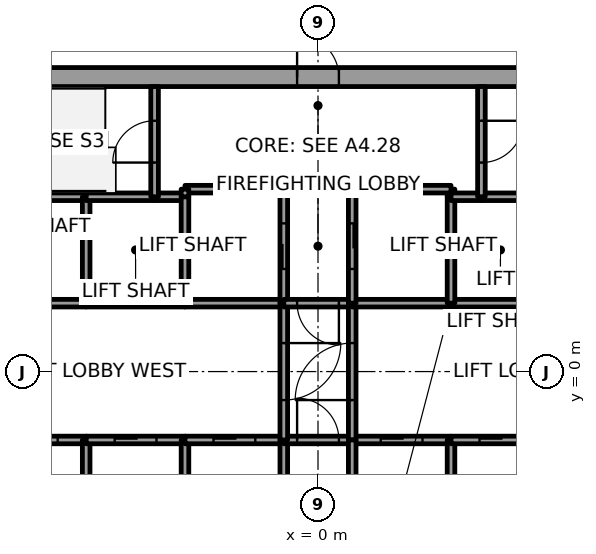
"""IFC4 building model, lengths in metres.
Left out: names, types, materials, properties, quantities, classifications, styles, units other than length and angle.
Written with IfcOpenShell. Run it as: python <this file> out.ifc"""

import sys

from ifc_helpers import new_model, si_unit, direction, frame, frame_2d, origin, place, context, subcontext, project, spatial, rectangle, extrude, element, fill, save


model = new_model("IFC4")
c1 = context("Model", 3, precision=1e-05, world=origin(), true_north=direction((0.0, 1.0)))
c2 = subcontext(c1, "Body", "Model", "MODEL_VIEW")
j1 = project(units=[si_unit("LENGTHUNIT", "METRE"), si_unit("PLANEANGLEUNIT", "RADIAN")], contexts=[c1])
p1 = place(None, origin())
s1 = spatial("IfcSite", under=j1, at=p1, CompositionType="ELEMENT")
p2 = place(p1, origin())
s2 = spatial("IfcBuilding", under=s1, at=p2, CompositionType="ELEMENT")
p3 = place(p2, frame((0.0, 0.0, 125.8)))
s3 = spatial("IfcBuildingStorey", under=s2, at=p3, CompositionType="ELEMENT", Elevation=125.8)
p4 = place(p3, frame((-11.0, 7.75, 0.0), z_axis=(0.0, 0.0, 1.0), x_axis=(1.0, 0.0, 0.0)))
e1 = element("IfcWall", 1, at=p4, inside=s3, PredefinedType="SHEAR", context=c2, shape_type="SweptSolid", body=[
    extrude(rectangle(XDim=22.0, YDim=0.5, at=frame_2d((11.0, 0.0))), origin(), (0.0, 0.0, 1.0), 4.0),
])
p5 = place(p4, frame((10.45, 0.0, 0.0)))
e2 = element("IfcOpeningElement", 2, at=p5, cuts=e1, PredefinedType="OPENING", context=c2, shape_type="SweptSolid", body=[
    extrude(rectangle(XDim=1.1, YDim=2.1, at=frame_2d((0.55, 1.05))), frame((0.0, 0.25, 0.0), z_axis=(0.0, -1.0, 0.0), x_axis=(1.0, 0.0, 0.0)), (0.0, 0.0, 1.0), 0.5),
])
p6 = place(p3, frame((-8.7, -1.8, 0.0), z_axis=(0.0, 0.0, 1.0), x_axis=(1.0, 0.0, 0.0)))
e3 = element("IfcWall", 3, at=p6, inside=s3, PredefinedType="SOLIDWALL", context=c2, shape_type="SweptSolid", body=[
    extrude(rectangle(XDim=2.6, YDim=0.2, at=frame_2d((1.3, 0.0))), origin(), (0.0, 0.0, 1.0), 3.85),
])
p7 = place(p6, frame((0.75, 0.0, 0.0)))
e4 = element("IfcOpeningElement", 4, at=p7, cuts=e3, PredefinedType="OPENING", context=c2, shape_type="SweptSolid", body=[
    extrude(rectangle(XDim=1.1, YDim=2.1, at=frame_2d((0.55, 1.05))), frame((0.0, 0.1, 0.0), z_axis=(0.0, -1.0, 0.0), x_axis=(1.0, 0.0, 0.0)), (0.0, 0.0, 1.0), 0.2),
])
for number, where, z_axis, x_axis in (
    (5, (-6.1, 1.8, 0.0), (0.0, 0.0, 1.0), (-1.0, 0.0, 0.0)),
    (6, (-6.1, 4.6, 0.0), (0.0, 0.0, 1.0), (-1.0, 0.0, 0.0)),
):
    element("IfcWall", number, at=place(p3, frame(where, z_axis=z_axis, x_axis=x_axis)), inside=s3, PredefinedType="SOLIDWALL", context=c2, shape_type="SweptSolid", body=[
        extrude(rectangle(XDim=2.6, YDim=0.2, at=frame_2d((1.3, 0.0))), origin(), (0.0, 0.0, 1.0), 3.85),
    ])
p8 = place(p3, frame((-6.1, -4.6, 0.0), z_axis=(0.0, 0.0, 1.0), x_axis=(0.0, 1.0, 0.0)))
e7 = element("IfcWall", 7, at=p8, inside=s3, PredefinedType="SOLIDWALL", context=c2, shape_type="SweptSolid", body=[
    extrude(rectangle(XDim=2.8, YDim=0.2, at=frame_2d((1.4, 0.0))), origin(), (0.0, 0.0, 1.0), 3.85),
])
p9 = place(p3, frame((-6.1, -1.8, 0.0), z_axis=(0.0, 0.0, 1.0), x_axis=(1.0, 0.0, 0.0)))
e8 = element("IfcWall", 8, at=p9, inside=s3, PredefinedType="SOLIDWALL", context=c2, shape_type="SweptSolid", body=[
    extrude(rectangle(XDim=2.6, YDim=0.2, at=frame_2d((1.3, 0.0))), origin(), (0.0, 0.0, 1.0), 3.85),
])
p10 = place(p9, frame((0.75, 0.0, 0.0)))
e9 = element("IfcOpeningElement", 9, at=p10, cuts=e8, PredefinedType="OPENING", context=c2, shape_type="SweptSolid", body=[
    extrude(rectangle(XDim=1.1, YDim=2.1, at=frame_2d((0.55, 1.05))), frame((0.0, 0.1, 0.0), z_axis=(0.0, -1.0, 0.0), x_axis=(1.0, 0.0, 0.0)), (0.0, 0.0, 1.0), 0.2),
])
p11 = place(p3, frame((-3.5, 1.8, 0.0), z_axis=(0.0, 0.0, 1.0), x_axis=(-1.0, 0.0, 0.0)))
e10 = element("IfcWall", 10, at=p11, inside=s3, PredefinedType="SOLIDWALL", context=c2, shape_type="SweptSolid", body=[
    extrude(rectangle(XDim=2.6, YDim=0.2, at=frame_2d((1.3, 0.0))), origin(), (0.0, 0.0, 1.0), 3.85),
])
p12 = place(p3, frame((-6.1, 1.8, 0.0), z_axis=(0.0, 0.0, 1.0), x_axis=(0.0, 1.0, 0.0)))
e11 = element("IfcWall", 11, at=p12, inside=s3, PredefinedType="SOLIDWALL", context=c2, shape_type="SweptSolid", body=[
    extrude(rectangle(XDim=2.8, YDim=0.2, at=frame_2d((1.4, 0.0))), origin(), (0.0, 0.0, 1.0), 3.85),
])
p13 = place(p3, frame((-4.3, 4.6, 0.0), z_axis=(0.0, 0.0, 1.0), x_axis=(-1.0, 0.0, 0.0)))
e12 = element("IfcWall", 12, at=p13, inside=s3, PredefinedType="SOLIDWALL", context=c2, shape_type="SweptSolid", body=[
    extrude(rectangle(XDim=1.8, YDim=0.2, at=frame_2d((0.9, 0.0))), origin(), (0.0, 0.0, 1.0), 3.85),
])
p14 = place(p3, frame((-3.5, 4.6, 0.0), z_axis=(0.0, 0.0, 1.0), x_axis=(-1.0, 0.0, 0.0)))
e13 = element("IfcWall", 13, at=p14, inside=s3, PredefinedType="SOLIDWALL", context=c2, shape_type="SweptSolid", body=[
    extrude(rectangle(XDim=0.8, YDim=0.2, at=frame_2d((0.4, 0.0))), origin(), (0.0, 0.0, 1.0), 3.85),
])
p15 = place(p3, frame((-4.3, 4.6, 0.0), z_axis=(0.0, 0.0, 1.0), x_axis=(0.0, 1.0, 0.0)))
e14 = element("IfcWall", 14, at=p15, inside=s3, PredefinedType="SOLIDWALL", context=c2, shape_type="SweptSolid", body=[
    extrude(rectangle(XDim=2.9, YDim=0.2, at=frame_2d((1.45, 0.0))), origin(), (0.0, 0.0, 1.0), 3.85),
])
p16 = place(p15, frame((0.9, 0.0, 0.0)))
e15 = element("IfcOpeningElement", 15, at=p16, cuts=e14, PredefinedType="OPENING", context=c2, shape_type="SweptSolid", body=[
    extrude(rectangle(XDim=1.1, YDim=2.1, at=frame_2d((0.55, 1.05))), frame((0.0, 0.1, 0.0), z_axis=(0.0, -1.0, 0.0), x_axis=(1.0, 0.0, 0.0)), (0.0, 0.0, 1.0), 0.2),
])
p17 = place(p3, frame((-3.5, -4.6, 0.0), z_axis=(0.0, 0.0, 1.0), x_axis=(0.0, 1.0, 0.0)))
e16 = element("IfcWall", 16, at=p17, inside=s3, PredefinedType="SOLIDWALL", context=c2, shape_type="SweptSolid", body=[
    extrude(rectangle(XDim=2.8, YDim=0.2, at=frame_2d((1.4, 0.0))), origin(), (0.0, 0.0, 1.0), 3.85),
])
p18 = place(p3, frame((-3.5, -1.8, 0.0), z_axis=(0.0, 0.0, 1.0), x_axis=(1.0, 0.0, 0.0)))
e17 = element("IfcWall", 17, at=p18, inside=s3, PredefinedType="SOLIDWALL", context=c2, shape_type="SweptSolid", body=[
    extrude(rectangle(XDim=2.6, YDim=0.2, at=frame_2d((1.3, 0.0))), origin(), (0.0, 0.0, 1.0), 3.85),
])
p19 = place(p18, frame((0.75, 0.0, 0.0)))
e18 = element("IfcOpeningElement", 18, at=p19, cuts=e17, PredefinedType="OPENING", context=c2, shape_type="SweptSolid", body=[
    extrude(rectangle(XDim=1.1, YDim=2.1, at=frame_2d((0.55, 1.05))), frame((0.0, 0.1, 0.0), z_axis=(0.0, -1.0, 0.0), x_axis=(1.0, 0.0, 0.0)), (0.0, 0.0, 1.0), 0.2),
])
p20 = place(p3, frame((-0.9, 1.8, 0.0), z_axis=(0.0, 0.0, 1.0), x_axis=(-1.0, 0.0, 0.0)))
e19 = element("IfcWall", 19, at=p20, inside=s3, PredefinedType="SOLIDWALL", context=c2, shape_type="SweptSolid", body=[
    extrude(rectangle(XDim=2.6, YDim=0.2, at=frame_2d((1.3, 0.0))), origin(), (0.0, 0.0, 1.0), 3.85),
])
p21 = place(p3, frame((-3.5, 4.6, 0.0), z_axis=(0.0, 0.0, 1.0), x_axis=(0.0, -1.0, 0.0)))
e20 = element("IfcWall", 20, at=p21, inside=s3, PredefinedType="SOLIDWALL", context=c2, shape_type="SweptSolid", body=[
    extrude(rectangle(XDim=2.8, YDim=0.2, at=frame_2d((1.4, 0.0))), origin(), (0.0, 0.0, 1.0), 3.85),
])
p22 = place(p3, frame((-0.9, 1.8, 0.0), z_axis=(0.0, 0.0, 1.0), x_axis=(0.0, 1.0, 0.0)))
e21 = element("IfcWall", 21, at=p22, inside=s3, PredefinedType="SOLIDWALL", context=c2, shape_type="SweptSolid", body=[
    extrude(rectangle(XDim=3.0, YDim=0.2, at=frame_2d((1.5, 0.0))), origin(), (0.0, 0.0, 1.0), 3.85),
])
p23 = place(p22, frame((0.9, 0.0, 0.0)))
e22 = element("IfcOpeningElement", 22, at=p23, cuts=e21, PredefinedType="OPENING", context=c2, shape_type="SweptSolid", body=[
    extrude(rectangle(XDim=1.2, YDim=2.1, at=frame_2d((0.6, 1.05))), frame((0.0, 0.1, 0.0), z_axis=(0.0, -1.0, 0.0), x_axis=(1.0, 0.0, 0.0)), (0.0, 0.0, 1.0), 0.2),
])
p24 = place(p3, frame((-0.9, 4.8, 0.0), z_axis=(0.0, 0.0, 1.0), x_axis=(-1.0, 0.0, 0.0)))
e23 = element("IfcWall", 23, at=p24, inside=s3, PredefinedType="SOLIDWALL", context=c2, shape_type="SweptSolid", body=[
    extrude(rectangle(XDim=2.6, YDim=0.2, at=frame_2d((1.3, 0.0))), origin(), (0.0, 0.0, 1.0), 3.85),
])
p25 = place(p3, frame((-3.5, 4.8, 0.0), z_axis=(0.0, 0.0, 1.0), x_axis=(0.0, -1.0, 0.0)))
e24 = element("IfcWall", 24, at=p25, inside=s3, PredefinedType="SOLIDWALL", context=c2, shape_type="SweptSolid", body=[
    extrude(rectangle(XDim=0.2, YDim=0.2, at=frame_2d((0.1, 0.0))), origin(), (0.0, 0.0, 1.0), 3.85),
])
p26 = place(p3, frame((-0.9, -4.6, 0.0), z_axis=(0.0, 0.0, 1.0), x_axis=(0.0, 1.0, 0.0)))
e25 = element("IfcWall", 25, at=p26, inside=s3, PredefinedType="SOLIDWALL", context=c2, shape_type="SweptSolid", body=[
    extrude(rectangle(XDim=2.8, YDim=0.2, at=frame_2d((1.4, 0.0))), origin(), (0.0, 0.0, 1.0), 3.85),
])
p27 = place(p3, frame((-0.9, -1.8, 0.0), z_axis=(0.0, 0.0, 1.0), x_axis=(1.0, 0.0, 0.0)))
e26 = element("IfcWall", 26, at=p27, inside=s3, PredefinedType="SOLIDWALL", context=c2, shape_type="SweptSolid", body=[
    extrude(rectangle(XDim=1.8, YDim=0.2, at=frame_2d((0.9, 0.0))), origin(), (0.0, 0.0, 1.0), 3.85),
])
p28 = place(p27, frame((0.35, 0.0, 0.0)))
e27 = element("IfcOpeningElement", 27, at=p28, cuts=e26, PredefinedType="OPENING", context=c2, shape_type="SweptSolid", body=[
    extrude(rectangle(XDim=1.1, YDim=2.1, at=frame_2d((0.55, 1.05))), frame((0.0, 0.1, 0.0), z_axis=(0.0, -1.0, 0.0), x_axis=(1.0, 0.0, 0.0)), (0.0, 0.0, 1.0), 0.2),
])
p29 = place(p3, frame((-0.9, 1.8, 0.0), z_axis=(0.0, 0.0, 1.0), x_axis=(0.0, -1.0, 0.0)))
e28 = element("IfcWall", 28, at=p29, inside=s3, PredefinedType="SOLIDWALL", context=c2, shape_type="SweptSolid", body=[
    extrude(rectangle(XDim=3.6, YDim=0.2, at=frame_2d((1.8, 0.0))), origin(), (0.0, 0.0, 1.0), 3.85),
])
p30 = place(p29, frame((1.05, 0.0, 0.0)))
e29 = element("IfcOpeningElement", 29, at=p30, cuts=e28, PredefinedType="OPENING", context=c2, shape_type="SweptSolid", body=[
    extrude(rectangle(XDim=1.5, YDim=2.1, at=frame_2d((0.75, 1.05))), frame((0.0, 0.1, 0.0), z_axis=(0.0, -1.0, 0.0), x_axis=(1.0, 0.0, 0.0)), (0.0, 0.0, 1.0), 0.2),
])
p31 = place(p3, frame((0.9, 1.8, 0.0), z_axis=(0.0, 0.0, 1.0), x_axis=(-1.0, 0.0, 0.0)))
e30 = element("IfcWall", 30, at=p31, inside=s3, PredefinedType="SOLIDWALL", context=c2, shape_type="SweptSolid", body=[
    extrude(rectangle(XDim=1.8, YDim=0.2, at=frame_2d((0.9, 0.0))), origin(), (0.0, 0.0, 1.0), 3.85),
])
p32 = place(p31, frame((0.35, 0.0, 0.0)))
e31 = element("IfcOpeningElement", 31, at=p32, cuts=e30, PredefinedType="OPENING", context=c2, shape_type="SweptSolid", body=[
    extrude(rectangle(XDim=1.1, YDim=2.1, at=frame_2d((0.55, 1.05))), frame((0.0, 0.1, 0.0), z_axis=(0.0, -1.0, 0.0), x_axis=(1.0, 0.0, 0.0)), (0.0, 0.0, 1.0), 0.2),
])
p33 = place(p3, frame((0.9, -1.8, 0.0), z_axis=(0.0, 0.0, 1.0), x_axis=(1.0, 0.0, 0.0)))
e32 = element("IfcWall", 32, at=p33, inside=s3, PredefinedType="SOLIDWALL", context=c2, shape_type="SweptSolid", body=[
    extrude(rectangle(XDim=2.6, YDim=0.2, at=frame_2d((1.3, 0.0))), origin(), (0.0, 0.0, 1.0), 3.85),
])
p34 = place(p33, frame((0.75, 0.0, 0.0)))
e33 = element("IfcOpeningElement", 33, at=p34, cuts=e32, PredefinedType="OPENING", context=c2, shape_type="SweptSolid", body=[
    extrude(rectangle(XDim=1.1, YDim=2.1, at=frame_2d((0.55, 1.05))), frame((0.0, 0.1, 0.0), z_axis=(0.0, -1.0, 0.0), x_axis=(1.0, 0.0, 0.0)), (0.0, 0.0, 1.0), 0.2),
])
p35 = place(p3, frame((0.9, -1.8, 0.0), z_axis=(0.0, 0.0, 1.0), x_axis=(0.0, 1.0, 0.0)))
e34 = element("IfcWall", 34, at=p35, inside=s3, PredefinedType="SOLIDWALL", context=c2, shape_type="SweptSolid", body=[
    extrude(rectangle(XDim=3.6, YDim=0.2, at=frame_2d((1.8, 0.0))), origin(), (0.0, 0.0, 1.0), 3.85),
])
p36 = place(p35, frame((1.05, 0.0, 0.0)))
e35 = element("IfcOpeningElement", 35, at=p36, cuts=e34, PredefinedType="OPENING", context=c2, shape_type="SweptSolid", body=[
    extrude(rectangle(XDim=1.5, YDim=2.1, at=frame_2d((0.75, 1.05))), frame((0.0, 0.1, 0.0), z_axis=(0.0, -1.0, 0.0), x_axis=(1.0, 0.0, 0.0)), (0.0, 0.0, 1.0), 0.2),
])
p37 = place(p3, frame((0.9, -1.8, 0.0), z_axis=(0.0, 0.0, 1.0), x_axis=(0.0, -1.0, 0.0)))
e36 = element("IfcWall", 36, at=p37, inside=s3, PredefinedType="SOLIDWALL", context=c2, shape_type="SweptSolid", body=[
    extrude(rectangle(XDim=2.8, YDim=0.2, at=frame_2d((1.4, 0.0))), origin(), (0.0, 0.0, 1.0), 3.85),
])
p38 = place(p3, frame((3.5, 1.8, 0.0), z_axis=(0.0, 0.0, 1.0), x_axis=(-1.0, 0.0, 0.0)))
e37 = element("IfcWall", 37, at=p38, inside=s3, PredefinedType="SOLIDWALL", context=c2, shape_type="SweptSolid", body=[
    extrude(rectangle(XDim=2.6, YDim=0.2, at=frame_2d((1.3, 0.0))), origin(), (0.0, 0.0, 1.0), 3.85),
])
p39 = place(p3, frame((3.5, 4.6, 0.0), z_axis=(0.0, 0.0, 1.0), x_axis=(0.0, 1.0, 0.0)))
e38 = element("IfcWall", 38, at=p39, inside=s3, PredefinedType="SOLIDWALL", context=c2, shape_type="SweptSolid", body=[
    extrude(rectangle(XDim=0.2, YDim=0.2, at=frame_2d((0.1, 0.0))), origin(), (0.0, 0.0, 1.0), 3.85),
])
p40 = place(p3, frame((3.5, 4.8, 0.0), z_axis=(0.0, 0.0, 1.0), x_axis=(-1.0, 0.0, 0.0)))
e39 = element("IfcWall", 39, at=p40, inside=s3, PredefinedType="SOLIDWALL", context=c2, shape_type="SweptSolid", body=[
    extrude(rectangle(XDim=2.6, YDim=0.2, at=frame_2d((1.3, 0.0))), origin(), (0.0, 0.0, 1.0), 3.85),
])
p41 = place(p3, frame((0.9, 4.8, 0.0), z_axis=(0.0, 0.0, 1.0), x_axis=(0.0, -1.0, 0.0)))
e40 = element("IfcWall", 40, at=p41, inside=s3, PredefinedType="SOLIDWALL", context=c2, shape_type="SweptSolid", body=[
    extrude(rectangle(XDim=3.0, YDim=0.2, at=frame_2d((1.5, 0.0))), origin(), (0.0, 0.0, 1.0), 3.85),
])
p42 = place(p41, frame((0.9, 0.0, 0.0)))
e41 = element("IfcOpeningElement", 41, at=p42, cuts=e40, PredefinedType="OPENING", context=c2, shape_type="SweptSolid", body=[
    extrude(rectangle(XDim=1.2, YDim=2.1, at=frame_2d((0.6, 1.05))), frame((0.0, 0.1, 0.0), z_axis=(0.0, -1.0, 0.0), x_axis=(1.0, 0.0, 0.0)), (0.0, 0.0, 1.0), 0.2),
])
p43 = place(p3, frame((3.5, -4.6, 0.0), z_axis=(0.0, 0.0, 1.0), x_axis=(0.0, 1.0, 0.0)))
e42 = element("IfcWall", 42, at=p43, inside=s3, PredefinedType="SOLIDWALL", context=c2, shape_type="SweptSolid", body=[
    extrude(rectangle(XDim=2.8, YDim=0.2, at=frame_2d((1.4, 0.0))), origin(), (0.0, 0.0, 1.0), 3.85),
])
p44 = place(p3, frame((3.5, -1.8, 0.0), z_axis=(0.0, 0.0, 1.0), x_axis=(1.0, 0.0, 0.0)))
e43 = element("IfcWall", 43, at=p44, inside=s3, PredefinedType="SOLIDWALL", context=c2, shape_type="SweptSolid", body=[
    extrude(rectangle(XDim=2.6, YDim=0.2, at=frame_2d((1.3, 0.0))), origin(), (0.0, 0.0, 1.0), 3.85),
])
p45 = place(p44, frame((0.75, 0.0, 0.0)))
e44 = element("IfcOpeningElement", 44, at=p45, cuts=e43, PredefinedType="OPENING", context=c2, shape_type="SweptSolid", body=[
    extrude(rectangle(XDim=1.1, YDim=2.1, at=frame_2d((0.55, 1.05))), frame((0.0, 0.1, 0.0), z_axis=(0.0, -1.0, 0.0), x_axis=(1.0, 0.0, 0.0)), (0.0, 0.0, 1.0), 0.2),
])
p46 = place(p3, frame((6.1, 1.8, 0.0), z_axis=(0.0, 0.0, 1.0), x_axis=(-1.0, 0.0, 0.0)))
e45 = element("IfcWall", 45, at=p46, inside=s3, PredefinedType="SOLIDWALL", context=c2, shape_type="SweptSolid", body=[
    extrude(rectangle(XDim=2.6, YDim=0.2, at=frame_2d((1.3, 0.0))), origin(), (0.0, 0.0, 1.0), 3.85),
])
p47 = place(p3, frame((3.5, 1.8, 0.0), z_axis=(0.0, 0.0, 1.0), x_axis=(0.0, 1.0, 0.0)))
e46 = element("IfcWall", 46, at=p47, inside=s3, PredefinedType="SOLIDWALL", context=c2, shape_type="SweptSolid", body=[
    extrude(rectangle(XDim=2.8, YDim=0.2, at=frame_2d((1.4, 0.0))), origin(), (0.0, 0.0, 1.0), 3.85),
])
p48 = place(p3, frame((4.3, 4.6, 0.0), z_axis=(0.0, 0.0, 1.0), x_axis=(-1.0, 0.0, 0.0)))
e47 = element("IfcWall", 47, at=p48, inside=s3, PredefinedType="SOLIDWALL", context=c2, shape_type="SweptSolid", body=[
    extrude(rectangle(XDim=0.8, YDim=0.2, at=frame_2d((0.4, 0.0))), origin(), (0.0, 0.0, 1.0), 3.85),
])
p49 = place(p3, frame((6.1, 4.6, 0.0), z_axis=(0.0, 0.0, 1.0), x_axis=(-1.0, 0.0, 0.0)))
e48 = element("IfcWall", 48, at=p49, inside=s3, PredefinedType="SOLIDWALL", context=c2, shape_type="SweptSolid", body=[
    extrude(rectangle(XDim=1.8, YDim=0.2, at=frame_2d((0.9, 0.0))), origin(), (0.0, 0.0, 1.0), 3.85),
])
p50 = place(p3, frame((4.3, 7.5, 0.0), z_axis=(0.0, 0.0, 1.0), x_axis=(0.0, -1.0, 0.0)))
e49 = element("IfcWall", 49, at=p50, inside=s3, PredefinedType="SOLIDWALL", context=c2, shape_type="SweptSolid", body=[
    extrude(rectangle(XDim=2.9, YDim=0.2, at=frame_2d((1.45, 0.0))), origin(), (0.0, 0.0, 1.0), 3.85),
])
p51 = place(p50, frame((0.9, 0.0, 0.0)))
e50 = element("IfcOpeningElement", 50, at=p51, cuts=e49, PredefinedType="OPENING", context=c2, shape_type="SweptSolid", body=[
    extrude(rectangle(XDim=1.1, YDim=2.1, at=frame_2d((0.55, 1.05))), frame((0.0, 0.1, 0.0), z_axis=(0.0, -1.0, 0.0), x_axis=(1.0, 0.0, 0.0)), (0.0, 0.0, 1.0), 0.2),
])
p52 = place(p7, origin())
e51 = element("IfcDoor", 51, at=p52, inside=s3, OperationType="SLIDING_TO_RIGHT", PredefinedType="DOOR", context=c2, shape_type="SweptSolid", body=[
    extrude(rectangle(XDim=1.1, YDim=2.1, at=frame_2d((0.55, 1.05))), frame((0.0, 0.025, 0.0), z_axis=(0.0, -1.0, 0.0), x_axis=(1.0, 0.0, 0.0)), (0.0, 0.0, 1.0), 0.05),
])
fill(e4, e51)
p53 = place(p10, origin())
e52 = element("IfcDoor", 52, at=p53, inside=s3, OperationType="SLIDING_TO_RIGHT", PredefinedType="DOOR", context=c2, shape_type="SweptSolid", body=[
    extrude(rectangle(XDim=1.1, YDim=2.1, at=frame_2d((0.55, 1.05))), frame((0.0, 0.025, 0.0), z_axis=(0.0, -1.0, 0.0), x_axis=(1.0, 0.0, 0.0)), (0.0, 0.0, 1.0), 0.05),
])
fill(e9, e52)
p54 = place(p19, origin())
e53 = element("IfcDoor", 53, at=p54, inside=s3, OperationType="SLIDING_TO_RIGHT", PredefinedType="DOOR", context=c2, shape_type="SweptSolid", body=[
    extrude(rectangle(XDim=1.1, YDim=2.1, at=frame_2d((0.55, 1.05))), frame((0.0, 0.025, 0.0), z_axis=(0.0, -1.0, 0.0), x_axis=(1.0, 0.0, 0.0)), (0.0, 0.0, 1.0), 0.05),
])
fill(e18, e53)
p55 = place(p34, origin())
e54 = element("IfcDoor", 54, at=p55, inside=s3, OperationType="SLIDING_TO_RIGHT", PredefinedType="DOOR", context=c2, shape_type="SweptSolid", body=[
    extrude(rectangle(XDim=1.1, YDim=2.1, at=frame_2d((0.55, 1.05))), frame((0.0, 0.025, 0.0), z_axis=(0.0, -1.0, 0.0), x_axis=(1.0, 0.0, 0.0)), (0.0, 0.0, 1.0), 0.05),
])
fill(e33, e54)
p56 = place(p45, origin())
e55 = element("IfcDoor", 55, at=p56, inside=s3, OperationType="SLIDING_TO_LEFT", PredefinedType="DOOR", context=c2, shape_type="SweptSolid", body=[
    extrude(rectangle(XDim=1.1, YDim=2.1, at=frame_2d((0.55, 1.05))), frame((0.0, 0.025, 0.0), z_axis=(0.0, -1.0, 0.0), x_axis=(1.0, 0.0, 0.0)), (0.0, 0.0, 1.0), 0.05),
])
fill(e44, e55)
p57 = place(p23, origin())
e56 = element("IfcDoor", 56, at=p57, inside=s3, OperationType="SLIDING_TO_RIGHT", PredefinedType="DOOR", context=c2, shape_type="SweptSolid", body=[
    extrude(rectangle(XDim=1.2, YDim=2.1, at=frame_2d((0.6, 1.05))), frame((0.0, 0.025, 0.0), z_axis=(0.0, -1.0, 0.0), x_axis=(1.0, 0.0, 0.0)), (0.0, 0.0, 1.0), 0.05),
])
fill(e22, e56)
p58 = place(p42, origin())
e57 = element("IfcDoor", 57, at=p58, inside=s3, OperationType="SLIDING_TO_LEFT", PredefinedType="DOOR", context=c2, shape_type="SweptSolid", body=[
    extrude(rectangle(XDim=1.2, YDim=2.1, at=frame_2d((0.6, 1.05))), frame((0.0, 0.025, 0.0), z_axis=(0.0, -1.0, 0.0), x_axis=(1.0, 0.0, 0.0)), (0.0, 0.0, 1.0), 0.05),
])
fill(e41, e57)
p59 = place(p30, origin())
e58 = element("IfcDoor", 58, at=p59, inside=s3, OperationType="DOUBLE_DOOR_SINGLE_SWING", PredefinedType="DOOR", context=c2, shape_type="SweptSolid", body=[
    extrude(rectangle(XDim=1.5, YDim=2.1, at=frame_2d((0.75, 1.05))), frame((0.0, 0.025, 0.0), z_axis=(0.0, -1.0, 0.0), x_axis=(1.0, 0.0, 0.0)), (0.0, 0.0, 1.0), 0.05),
])
fill(e29, e58)
p60 = place(p36, origin())
e59 = element("IfcDoor", 59, at=p60, inside=s3, OperationType="DOUBLE_DOOR_SINGLE_SWING", PredefinedType="DOOR", context=c2, shape_type="SweptSolid", body=[
    extrude(rectangle(XDim=1.5, YDim=2.1, at=frame_2d((0.75, 1.05))), frame((0.0, 0.025, 0.0), z_axis=(0.0, -1.0, 0.0), x_axis=(1.0, 0.0, 0.0)), (0.0, 0.0, 1.0), 0.05),
])
fill(e35, e59)
p61 = place(p32, origin())
e60 = element("IfcDoor", 60, at=p61, inside=s3, OperationType="SINGLE_SWING_LEFT", PredefinedType="DOOR", context=c2, shape_type="SweptSolid", body=[
    extrude(rectangle(XDim=1.1, YDim=2.1, at=frame_2d((0.55, 1.05))), frame((0.0, 0.025, 0.0), z_axis=(0.0, -1.0, 0.0), x_axis=(1.0, 0.0, 0.0)), (0.0, 0.0, 1.0), 0.05),
])
fill(e31, e60)
p62 = place(p28, origin())
e61 = element("IfcDoor", 61, at=p62, inside=s3, OperationType="SINGLE_SWING_LEFT", PredefinedType="DOOR", context=c2, shape_type="SweptSolid", body=[
    extrude(rectangle(XDim=1.1, YDim=2.1, at=frame_2d((0.55, 1.05))), frame((0.0, 0.025, 0.0), z_axis=(0.0, -1.0, 0.0), x_axis=(1.0, 0.0, 0.0)), (0.0, 0.0, 1.0), 0.05),
])
fill(e27, e61)
p63 = place(p16, origin())
e62 = element("IfcDoor", 62, at=p63, inside=s3, OperationType="SINGLE_SWING_LEFT", PredefinedType="DOOR", context=c2, shape_type="SweptSolid", body=[
    extrude(rectangle(XDim=1.1, YDim=2.1, at=frame_2d((0.55, 1.05))), frame((0.0, 0.025, 0.0), z_axis=(0.0, -1.0, 0.0), x_axis=(1.0, 0.0, 0.0)), (0.0, 0.0, 1.0), 0.05),
])
fill(e15, e62)
p64 = place(p51, origin())
e63 = element("IfcDoor", 63, at=p64, inside=s3, OperationType="SINGLE_SWING_LEFT", PredefinedType="DOOR", context=c2, shape_type="SweptSolid", body=[
    extrude(rectangle(XDim=1.1, YDim=2.1, at=frame_2d((0.55, 1.05))), frame((0.0, 0.025, 0.0), z_axis=(0.0, -1.0, 0.0), x_axis=(1.0, 0.0, 0.0)), (0.0, 0.0, 1.0), 0.05),
])
fill(e50, e63)
p65 = place(p5, origin())
e64 = element("IfcDoor", 64, at=p65, inside=s3, OperationType="SINGLE_SWING_LEFT", PredefinedType="DOOR", context=c2, shape_type="SweptSolid", body=[
    extrude(rectangle(XDim=1.1, YDim=2.1, at=frame_2d((0.55, 1.05))), frame((0.0, 0.025, 0.0), z_axis=(0.0, -1.0, 0.0), x_axis=(1.0, 0.0, 0.0)), (0.0, 0.0, 1.0), 0.05),
])
fill(e2, e64)
save(model, sys.argv[1])
